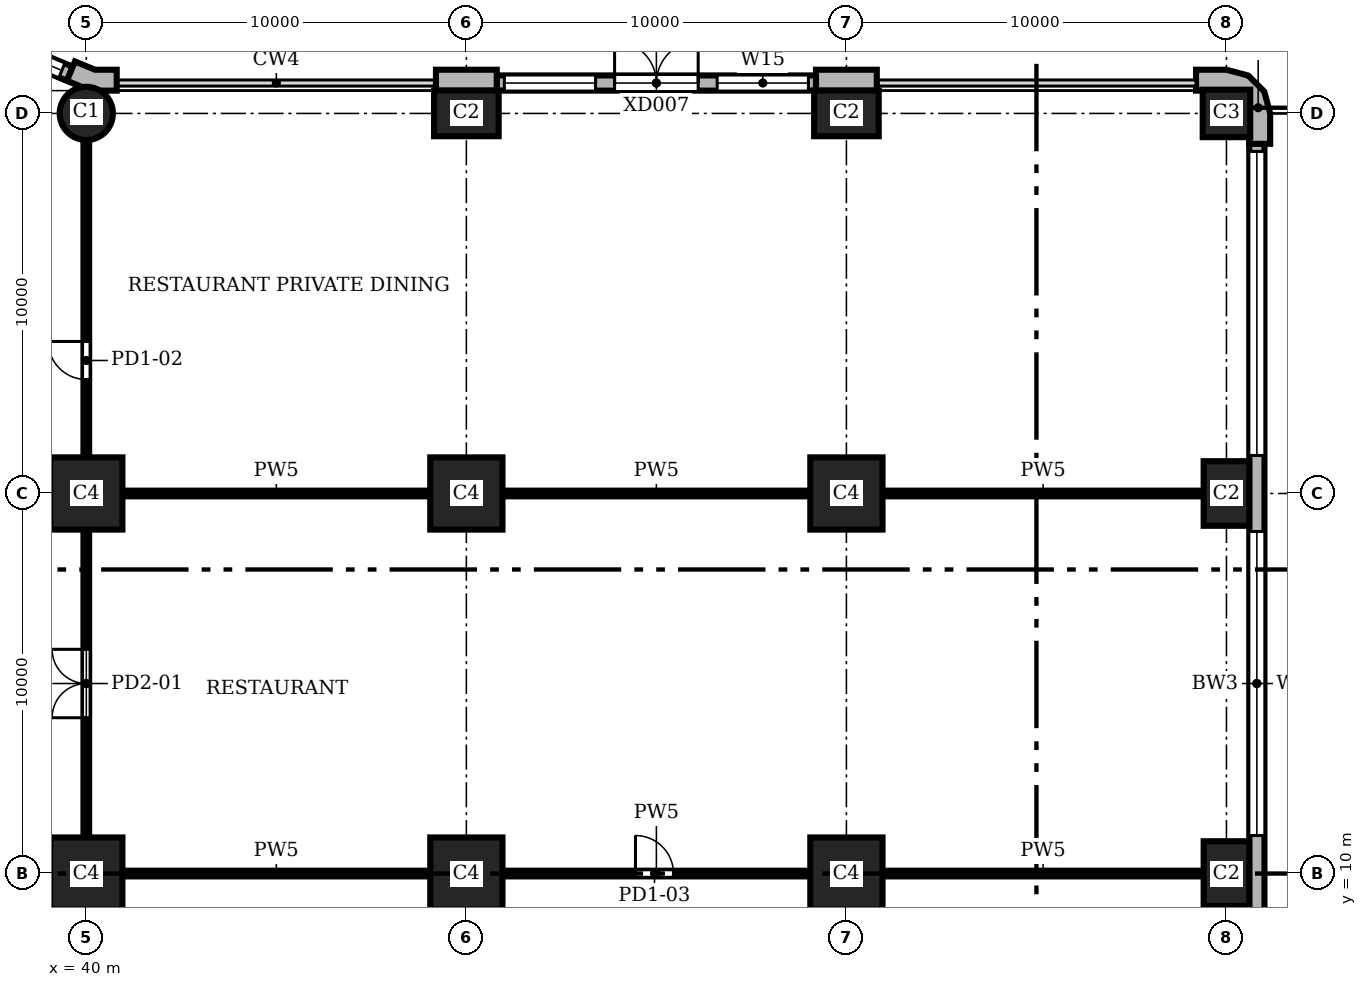
"""IFC4 building model, lengths in metres.
Left out: names, types, materials, properties, quantities, classifications, styles, units other than length and angle.
Written with IfcOpenShell. Run it as: python <this file> out.ifc"""

import sys

from ifc_helpers import new_model, si_unit, direction, frame, frame_2d, origin, origin_2d, place, context, subcontext, project, spatial, polyline, rectangle, circle, outline, extrude, element, fill, save


model = new_model("IFC4")
c1 = context("Model", 3, precision=1e-05, world=origin(), true_north=direction((0.0, 1.0)))
c2 = subcontext(c1, "Body", "Model", "MODEL_VIEW")
j1 = project(units=[si_unit("LENGTHUNIT", "METRE"), si_unit("PLANEANGLEUNIT", "RADIAN")], contexts=[c1])
p1 = place(None, origin())
s1 = spatial("IfcSite", under=j1, at=p1, CompositionType="ELEMENT")
p2 = place(p1, origin())
s2 = spatial("IfcBuilding", under=s1, at=p2, CompositionType="ELEMENT")
p3 = place(p2, frame((0.0, 0.0, 6.0)))
s3 = spatial("IfcBuildingStorey", under=s2, at=p3, CompositionType="ELEMENT", Elevation=6.0)
for number, where, z_axis, x_axis in (
    (1, (70.0, 10.0, 0.0), (0.0, 0.0, 1.0), (0.0, 1.0, 0.0)),
    (2, (70.0, 20.0, 0.0), (0.0, 0.0, 1.0), (0.0, 1.0, 0.0)),
):
    element("IfcColumn", number, at=place(p3, frame(where, z_axis=z_axis, x_axis=x_axis)), inside=s3, PredefinedType="COLUMN", context=c2, shape_type="SweptSolid", body=[
        extrude(rectangle(XDim=1.7, YDim=1.2, at=origin_2d()), origin(), (0.0, 0.0, 1.0), 6.0),
    ])
p4 = place(p3, frame((70.0, 30.0, 0.0), z_axis=(0.0, 0.0, 1.0), x_axis=(1.0, 0.0, 0.0)))
e3 = element("IfcColumn", 3, at=p4, inside=s3, PredefinedType="COLUMN", context=c2, shape_type="SweptSolid", body=[
    extrude(rectangle(XDim=1.25, YDim=1.25, at=origin_2d()), origin(), (0.0, 0.0, 1.0), 6.0),
])
for number, where, z_axis, x_axis in (
    (4, (60.0, 30.0, 0.0), (0.0, 0.0, 1.0), (1.0, 0.0, 0.0)),
    (5, (50.0, 30.0, 0.0), (0.0, 0.0, 1.0), (1.0, 0.0, 0.0)),
):
    element("IfcColumn", number, at=place(p3, frame(where, z_axis=z_axis, x_axis=x_axis)), inside=s3, PredefinedType="COLUMN", context=c2, shape_type="SweptSolid", body=[
        extrude(rectangle(XDim=1.7, YDim=1.2, at=origin_2d()), origin(), (0.0, 0.0, 1.0), 6.0),
    ])
p5 = place(p3, frame((40.0, 30.0, 0.0), z_axis=(0.0, 0.0, 1.0), x_axis=(1.0, 0.0, 0.0)))
e6 = element("IfcColumn", 6, at=p5, inside=s3, PredefinedType="COLUMN", context=c2, shape_type="SweptSolid", body=[
    extrude(circle(Radius=0.7, at=origin_2d()), origin(), (0.0, 0.0, 1.0), 6.0),
])
for number, where, z_axis, x_axis in (
    (7, (40.0, 10.0, 0.0), (0.0, 0.0, 1.0), (1.0, 0.0, 0.0)),
    (8, (40.0, 20.0, 0.0), (0.0, 0.0, 1.0), (1.0, 0.0, 0.0)),
    (9, (50.0, 10.0, 0.0), (0.0, 0.0, 1.0), (1.0, 0.0, 0.0)),
    (10, (50.0, 20.0, 0.0), (0.0, 0.0, 1.0), (1.0, 0.0, 0.0)),
    (11, (60.0, 10.0, 0.0), (0.0, 0.0, 1.0), (1.0, 0.0, 0.0)),
    (12, (60.0, 20.0, 0.0), (0.0, 0.0, 1.0), (1.0, 0.0, 0.0)),
):
    element("IfcColumn", number, at=place(p3, frame(where, z_axis=z_axis, x_axis=x_axis)), inside=s3, PredefinedType="COLUMN", context=c2, shape_type="SweptSolid", body=[
        extrude(rectangle(XDim=1.9, YDim=1.9, at=origin_2d()), origin(), (0.0, 0.0, 1.0), 6.0),
    ])
p6 = place(p3, origin())
e13 = element("IfcWall", 13, at=p6, inside=s3, PredefinedType="SOLIDWALL", context=c2, shape_type="SweptSolid", body=[
    extrude(outline(polyline([(71.0, 29.2), (71.15, 29.2), (71.15, 30.0), (70.996, 30.575), (70.575, 30.996), (70.0, 31.15), (69.2, 31.15), (69.2, 31.0), (69.2, 30.6), (70.0, 30.6), (70.3, 30.52), (70.52, 30.3), (70.6, 30.0), (70.6, 29.2), (71.0, 29.2)])), origin(), (0.0, 0.0, 1.0), 6.0),
])
e14 = element("IfcWall", 14, at=p6, inside=s3, PredefinedType="SOLIDWALL", context=c2, shape_type="SweptSolid", body=[
    extrude(outline(polyline([(60.8, 31.0), (60.8, 31.15), (60.0, 31.15), (59.2, 31.15), (59.2, 31.0), (59.2, 30.6), (60.0, 30.6), (60.8, 30.6), (60.8, 31.0)])), origin(), (0.0, 0.0, 1.0), 6.0),
])
e15 = element("IfcWall", 15, at=p6, inside=s3, PredefinedType="SOLIDWALL", context=c2, shape_type="SweptSolid", body=[
    extrude(outline(polyline([(50.8, 31.0), (50.8, 31.15), (50.0, 31.15), (49.2, 31.15), (49.2, 31.0), (49.2, 30.6), (50.0, 30.6), (50.8, 30.6), (50.8, 31.0)])), origin(), (0.0, 0.0, 1.0), 6.0),
])
e16 = element("IfcWall", 16, at=p6, inside=s3, PredefinedType="SOLIDWALL", context=c2, shape_type="SweptSolid", body=[
    extrude(outline(polyline([(40.8, 31.0), (40.8, 31.15), (40.229, 31.15), (39.701, 31.369), (39.644, 31.23), (39.49, 30.861), (40.119, 30.6), (40.8, 30.6), (40.8, 31.0)])), origin(), (0.0, 0.0, 1.0), 6.0),
])
p7 = place(p3, frame((70.8, 0.8, 0.0), z_axis=(0.0, 0.0, 1.0), x_axis=(0.0, 1.0, 0.0)))
e17 = element("IfcWall", 17, at=p7, inside=s3, PredefinedType="SOLIDWALL", context=c2, shape_type="SweptSolid", body=[
    extrude(rectangle(XDim=28.4, YDim=0.4, at=frame_2d((14.2, 0.0))), origin(), (0.0, 0.0, 1.0), 6.0),
])
p8 = place(p7, frame((0.2, 0.0, 0.9)))
e18 = element("IfcOpeningElement", 18, at=p8, cuts=e17, PredefinedType="OPENING", context=c2, shape_type="SweptSolid", body=[
    extrude(rectangle(XDim=8.0, YDim=4.4, at=frame_2d((4.0, 2.2))), frame((0.0, 0.21, 0.0), z_axis=(0.0, -1.0, 0.0), x_axis=(1.0, 0.0, 0.0)), (0.0, 0.0, 1.0), 0.42),
])
p9 = place(p7, frame((10.2, 0.0, 0.9)))
e19 = element("IfcOpeningElement", 19, at=p9, cuts=e17, PredefinedType="OPENING", context=c2, shape_type="SweptSolid", body=[
    extrude(rectangle(XDim=8.0, YDim=4.4, at=frame_2d((4.0, 2.2))), frame((0.0, 0.21, 0.0), z_axis=(0.0, -1.0, 0.0), x_axis=(1.0, 0.0, 0.0)), (0.0, 0.0, 1.0), 0.42),
])
p10 = place(p7, frame((20.2, 0.0, 0.9)))
e20 = element("IfcOpeningElement", 20, at=p10, cuts=e17, PredefinedType="OPENING", context=c2, shape_type="SweptSolid", body=[
    extrude(rectangle(XDim=8.0, YDim=4.4, at=frame_2d((4.0, 2.2))), frame((0.0, 0.21, 0.0), z_axis=(0.0, -1.0, 0.0), x_axis=(1.0, 0.0, 0.0)), (0.0, 0.0, 1.0), 0.42),
])
p11 = place(p3, frame((59.2, 30.8, 0.0), z_axis=(0.0, 0.0, 1.0), x_axis=(-1.0, 0.0, 0.0)))
e21 = element("IfcWall", 21, at=p11, inside=s3, PredefinedType="SOLIDWALL", context=c2, shape_type="SweptSolid", body=[
    extrude(rectangle(XDim=8.4, YDim=0.4, at=frame_2d((4.2, 0.0))), origin(), (0.0, 0.0, 1.0), 6.0),
])
p12 = place(p11, frame((0.2, 0.0, 0.9)))
e22 = element("IfcOpeningElement", 22, at=p12, cuts=e21, PredefinedType="OPENING", context=c2, shape_type="SweptSolid", body=[
    extrude(rectangle(XDim=2.4, YDim=4.4, at=frame_2d((1.2, 2.2))), frame((0.0, 0.21, 0.0), z_axis=(0.0, -1.0, 0.0), x_axis=(1.0, 0.0, 0.0)), (0.0, 0.0, 1.0), 0.42),
])
p13 = place(p11, frame((3.1, 0.0, 0.0)))
e23 = element("IfcOpeningElement", 23, at=p13, cuts=e21, PredefinedType="OPENING", context=c2, shape_type="SweptSolid", body=[
    extrude(rectangle(XDim=2.2, YDim=2.4, at=frame_2d((1.1, 1.2))), frame((0.0, 0.21, 0.0), z_axis=(0.0, -1.0, 0.0), x_axis=(1.0, 0.0, 0.0)), (0.0, 0.0, 1.0), 0.42),
])
p14 = place(p11, frame((5.8, 0.0, 0.9)))
e24 = element("IfcOpeningElement", 24, at=p14, cuts=e21, PredefinedType="OPENING", context=c2, shape_type="SweptSolid", body=[
    extrude(rectangle(XDim=2.4, YDim=4.4, at=frame_2d((1.2, 2.2))), frame((0.0, 0.21, 0.0), z_axis=(0.0, -1.0, 0.0), x_axis=(1.0, 0.0, 0.0)), (0.0, 0.0, 1.0), 0.42),
])
p15 = place(p3, frame((39.567, 31.045, 0.0), z_axis=(0.0, 0.0, 1.0), x_axis=(-0.923891000409, 0.382655745237, 0.0)))
e25 = element("IfcWall", 25, at=p15, inside=s3, PredefinedType="SOLIDWALL", context=c2, shape_type="SweptSolid", body=[
    extrude(rectangle(XDim=6.053, YDim=0.4, at=frame_2d((3.027, 0.0))), origin(), (0.0, 0.0, 1.0), 6.0),
])
p16 = place(p15, frame((0.227, 0.0, 0.9)))
e26 = element("IfcOpeningElement", 26, at=p16, cuts=e25, PredefinedType="OPENING", context=c2, shape_type="SweptSolid", body=[
    extrude(rectangle(XDim=1.2, YDim=4.4, at=frame_2d((0.6, 2.2))), frame((0.0, 0.21, 0.0), z_axis=(0.0, -1.0, 0.0), x_axis=(1.0, 0.0, 0.0)), (0.0, 0.0, 1.0), 0.42),
])
p17 = place(p15, frame((1.927, 0.0, 0.0)))
e27 = element("IfcOpeningElement", 27, at=p17, cuts=e25, PredefinedType="OPENING", context=c2, shape_type="SweptSolid", body=[
    extrude(rectangle(XDim=2.2, YDim=2.4, at=frame_2d((1.1, 1.2))), frame((0.0, 0.21, 0.0), z_axis=(0.0, -1.0, 0.0), x_axis=(1.0, 0.0, 0.0)), (0.0, 0.0, 1.0), 0.42),
])
p18 = place(p15, frame((4.627, 0.0, 0.9)))
e28 = element("IfcOpeningElement", 28, at=p18, cuts=e25, PredefinedType="OPENING", context=c2, shape_type="SweptSolid", body=[
    extrude(rectangle(XDim=1.2, YDim=4.4, at=frame_2d((0.6, 2.2))), frame((0.0, 0.21, 0.0), z_axis=(0.0, -1.0, 0.0), x_axis=(1.0, 0.0, 0.0)), (0.0, 0.0, 1.0), 0.42),
])
p19 = place(p3, frame((40.0, -0.6, 0.0), z_axis=(0.0, 0.0, 1.0), x_axis=(0.0, 1.0, 0.0)))
e29 = element("IfcWall", 29, at=p19, inside=s3, PredefinedType="PARTITIONING", context=c2, shape_type="SweptSolid", body=[
    extrude(rectangle(XDim=31.2, YDim=0.15, at=frame_2d((15.6, 0.0))), origin(), (0.0, 0.0, 1.0), 5.68),
])
p20 = place(p19, frame((14.7, 0.0, 0.0)))
e30 = element("IfcOpeningElement", 30, at=p20, cuts=e29, PredefinedType="OPENING", context=c2, shape_type="SweptSolid", body=[
    extrude(rectangle(XDim=1.8, YDim=2.1, at=frame_2d((0.9, 1.05))), frame((0.0, 0.085, 0.0), z_axis=(0.0, -1.0, 0.0), x_axis=(1.0, 0.0, 0.0)), (0.0, 0.0, 1.0), 0.17),
])
p21 = place(p19, frame((6.0, 0.0, 0.0)))
e31 = element("IfcOpeningElement", 31, at=p21, cuts=e29, PredefinedType="OPENING", context=c2, shape_type="SweptSolid", body=[
    extrude(rectangle(XDim=1.0, YDim=2.1, at=frame_2d((0.5, 1.05))), frame((0.0, 0.085, 0.0), z_axis=(0.0, -1.0, 0.0), x_axis=(1.0, 0.0, 0.0)), (0.0, 0.0, 1.0), 0.17),
])
p22 = place(p19, frame((23.6, 0.0, 0.0)))
e32 = element("IfcOpeningElement", 32, at=p22, cuts=e29, PredefinedType="OPENING", context=c2, shape_type="SweptSolid", body=[
    extrude(rectangle(XDim=1.0, YDim=2.1, at=frame_2d((0.5, 1.05))), frame((0.0, 0.085, 0.0), z_axis=(0.0, -1.0, 0.0), x_axis=(1.0, 0.0, 0.0)), (0.0, 0.0, 1.0), 0.17),
])
p23 = place(p3, frame((40.95, 10.0, 0.0), z_axis=(0.0, 0.0, 1.0), x_axis=(1.0, 0.0, 0.0)))
e33 = element("IfcWall", 33, at=p23, inside=s3, PredefinedType="PARTITIONING", context=c2, shape_type="SweptSolid", body=[
    extrude(rectangle(XDim=8.1, YDim=0.15, at=frame_2d((4.05, 0.0))), origin(), (0.0, 0.0, 1.0), 5.68),
])
p24 = place(p3, frame((50.95, 10.0, 0.0), z_axis=(0.0, 0.0, 1.0), x_axis=(1.0, 0.0, 0.0)))
e34 = element("IfcWall", 34, at=p24, inside=s3, PredefinedType="PARTITIONING", context=c2, shape_type="SweptSolid", body=[
    extrude(rectangle(XDim=8.1, YDim=0.15, at=frame_2d((4.05, 0.0))), origin(), (0.0, 0.0, 1.0), 5.68),
])
p25 = place(p24, frame((3.5, 0.0, 0.0)))
e35 = element("IfcOpeningElement", 35, at=p25, cuts=e34, PredefinedType="OPENING", context=c2, shape_type="SweptSolid", body=[
    extrude(rectangle(XDim=1.0, YDim=2.1, at=frame_2d((0.5, 1.05))), frame((0.0, 0.085, 0.0), z_axis=(0.0, -1.0, 0.0), x_axis=(1.0, 0.0, 0.0)), (0.0, 0.0, 1.0), 0.17),
])
p26 = place(p3, frame((60.95, 10.0, 0.0), z_axis=(0.0, 0.0, 1.0), x_axis=(1.0, 0.0, 0.0)))
e36 = element("IfcWall", 36, at=p26, inside=s3, PredefinedType="PARTITIONING", context=c2, shape_type="SweptSolid", body=[
    extrude(rectangle(XDim=8.45, YDim=0.15, at=frame_2d((4.225, 0.0))), origin(), (0.0, 0.0, 1.0), 5.68),
])
for number, where, z_axis, x_axis in (
    (37, (40.95, 20.0, 0.0), (0.0, 0.0, 1.0), (1.0, 0.0, 0.0)),
    (38, (50.95, 20.0, 0.0), (0.0, 0.0, 1.0), (1.0, 0.0, 0.0)),
):
    element("IfcWall", number, at=place(p3, frame(where, z_axis=z_axis, x_axis=x_axis)), inside=s3, PredefinedType="PARTITIONING", context=c2, shape_type="SweptSolid", body=[
        extrude(rectangle(XDim=8.1, YDim=0.15, at=frame_2d((4.05, 0.0))), origin(), (0.0, 0.0, 1.0), 5.68),
    ])
p27 = place(p3, frame((60.95, 20.0, 0.0), z_axis=(0.0, 0.0, 1.0), x_axis=(1.0, 0.0, 0.0)))
e39 = element("IfcWall", 39, at=p27, inside=s3, PredefinedType="PARTITIONING", context=c2, shape_type="SweptSolid", body=[
    extrude(rectangle(XDim=8.45, YDim=0.15, at=frame_2d((4.225, 0.0))), origin(), (0.0, 0.0, 1.0), 5.68),
])
p28 = place(p9, origin())
e40 = element("IfcWindow", 40, at=p28, inside=s3, PartitioningType="SINGLE_PANEL", PredefinedType="WINDOW", context=c2, shape_type="SweptSolid", body=[
    extrude(rectangle(XDim=8.0, YDim=4.4, at=frame_2d((4.0, 2.2))), frame((0.0, 0.16, 0.0), z_axis=(0.0, -1.0, 0.0), x_axis=(1.0, 0.0, 0.0)), (0.0, 0.0, 1.0), 0.06),
])
fill(e19, e40)
p29 = place(p10, origin())
e41 = element("IfcWindow", 41, at=p29, inside=s3, PartitioningType="SINGLE_PANEL", PredefinedType="WINDOW", context=c2, shape_type="SweptSolid", body=[
    extrude(rectangle(XDim=8.0, YDim=4.4, at=frame_2d((4.0, 2.2))), frame((0.0, 0.16, 0.0), z_axis=(0.0, -1.0, 0.0), x_axis=(1.0, 0.0, 0.0)), (0.0, 0.0, 1.0), 0.06),
])
fill(e20, e41)
p30 = place(p12, origin())
e42 = element("IfcWindow", 42, at=p30, inside=s3, PartitioningType="SINGLE_PANEL", PredefinedType="WINDOW", context=c2, shape_type="SweptSolid", body=[
    extrude(rectangle(XDim=2.4, YDim=4.4, at=frame_2d((1.2, 2.2))), frame((0.0, 0.16, 0.0), z_axis=(0.0, -1.0, 0.0), x_axis=(1.0, 0.0, 0.0)), (0.0, 0.0, 1.0), 0.06),
])
fill(e22, e42)
p31 = place(p13, frame((2.2, 0.0, 0.0), z_axis=(0.0, 0.0, 1.0), x_axis=(-1.0, 0.0, 0.0)))
e43 = element("IfcDoor", 43, at=p31, inside=s3, OperationType="DOUBLE_DOOR_DOUBLE_SWING", PredefinedType="DOOR", context=c2, shape_type="SweptSolid", body=[
    extrude(rectangle(XDim=2.2, YDim=2.4, at=frame_2d((1.1, 1.2))), frame((0.0, 0.025, 0.0), z_axis=(0.0, -1.0, 0.0), x_axis=(1.0, 0.0, 0.0)), (0.0, 0.0, 1.0), 0.05),
])
fill(e23, e43)
p32 = place(p14, origin())
e44 = element("IfcWindow", 44, at=p32, inside=s3, PartitioningType="SINGLE_PANEL", PredefinedType="WINDOW", context=c2, shape_type="SweptSolid", body=[
    extrude(rectangle(XDim=2.4, YDim=4.4, at=frame_2d((1.2, 2.2))), frame((0.0, 0.16, 0.0), z_axis=(0.0, -1.0, 0.0), x_axis=(1.0, 0.0, 0.0)), (0.0, 0.0, 1.0), 0.06),
])
fill(e24, e44)
p33 = place(p16, origin())
e45 = element("IfcWindow", 45, at=p33, inside=s3, PartitioningType="SINGLE_PANEL", PredefinedType="WINDOW", context=c2, shape_type="SweptSolid", body=[
    extrude(rectangle(XDim=1.2, YDim=4.4, at=frame_2d((0.6, 2.2))), frame((0.0, 0.16, 0.0), z_axis=(0.0, -1.0, 0.0), x_axis=(1.0, 0.0, 0.0)), (0.0, 0.0, 1.0), 0.06),
])
fill(e26, e45)
p34 = place(p20, origin())
e46 = element("IfcDoor", 46, at=p34, inside=s3, OperationType="DOUBLE_DOOR_SINGLE_SWING", PredefinedType="DOOR", context=c2, shape_type="SweptSolid", body=[
    extrude(rectangle(XDim=1.8, YDim=2.1, at=frame_2d((0.9, 1.05))), frame((0.0, 0.025, 0.0), z_axis=(0.0, -1.0, 0.0), x_axis=(1.0, 0.0, 0.0)), (0.0, 0.0, 1.0), 0.05),
])
fill(e30, e46)
p35 = place(p22, origin())
e47 = element("IfcDoor", 47, at=p35, inside=s3, OperationType="SINGLE_SWING_RIGHT", PredefinedType="DOOR", context=c2, shape_type="SweptSolid", body=[
    extrude(rectangle(XDim=1.0, YDim=2.1, at=frame_2d((0.5, 1.05))), frame((0.0, 0.025, 0.0), z_axis=(0.0, -1.0, 0.0), x_axis=(1.0, 0.0, 0.0)), (0.0, 0.0, 1.0), 0.05),
])
fill(e32, e47)
p36 = place(p25, origin())
e48 = element("IfcDoor", 48, at=p36, inside=s3, OperationType="SINGLE_SWING_LEFT", PredefinedType="DOOR", context=c2, shape_type="SweptSolid", body=[
    extrude(rectangle(XDim=1.0, YDim=2.1, at=frame_2d((0.5, 1.05))), frame((0.0, 0.025, 0.0), z_axis=(0.0, -1.0, 0.0), x_axis=(1.0, 0.0, 0.0)), (0.0, 0.0, 1.0), 0.05),
])
fill(e35, e48)
save(model, sys.argv[1])
